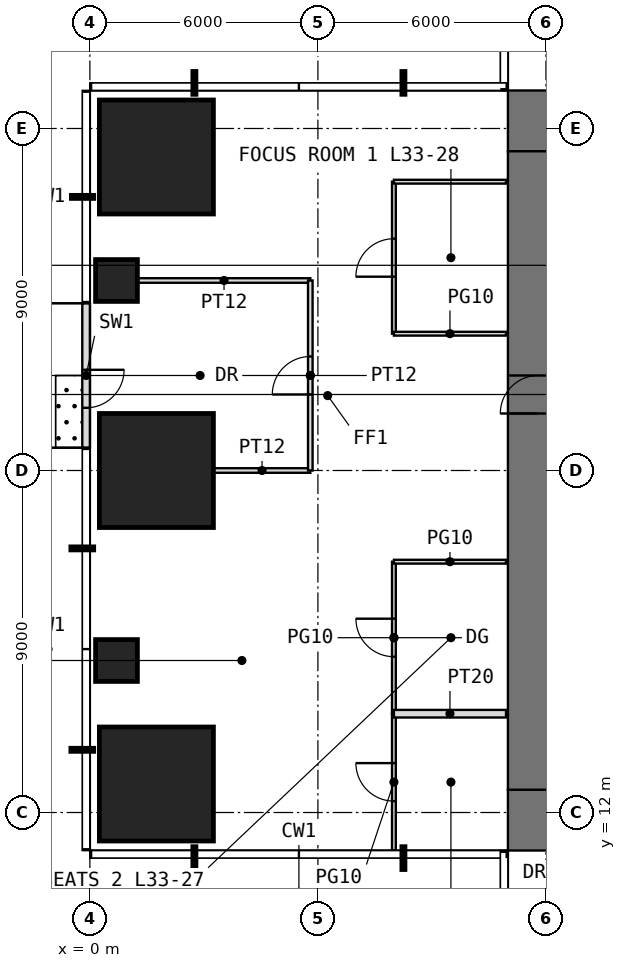
"""IFC4 building model, lengths in metres.
Left out: names, types, materials, properties, quantities, classifications, styles, units other than length and angle.
Written with IfcOpenShell. Run it as: python <this file> out.ifc"""

import sys

from ifc_helpers import new_model, si_unit, direction, frame, frame_2d, origin, origin_2d, place, context, subcontext, project, spatial, rectangle, extrude, element, fill, save


model = new_model("IFC4")
c1 = context("Model", 3, precision=1e-05, world=origin(), true_north=direction((0.0, 1.0)))
c2 = subcontext(c1, "Body", "Model", "MODEL_VIEW")
j1 = project(units=[si_unit("LENGTHUNIT", "METRE"), si_unit("PLANEANGLEUNIT", "RADIAN")], contexts=[c1])
p1 = place(None, origin())
s1 = spatial("IfcSite", under=j1, at=p1, CompositionType="ELEMENT")
p2 = place(p1, origin())
s2 = spatial("IfcBuilding", under=s1, at=p2, CompositionType="ELEMENT")
p3 = place(p2, frame((0.0, 0.0, 140.5)))
s3 = spatial("IfcBuildingStorey", under=s2, at=p3, CompositionType="ELEMENT", Elevation=140.5)
p4 = place(p3, frame((1.75, 12.75, 0.0), z_axis=(0.0, 0.0, 1.0), x_axis=(1.0, 0.0, 0.0)))
e1 = element("IfcColumn", 1, at=p4, inside=s3, PredefinedType="COLUMN", context=c2, shape_type="SweptSolid", body=[
    extrude(rectangle(XDim=3.0, YDim=3.0, at=origin_2d()), origin(), (0.0, 0.0, 1.0), 4.0),
])
p5 = place(p3, frame((0.7, 16.0, 0.0), z_axis=(0.0, 0.0, 1.0), x_axis=(1.0, 0.0, 0.0)))
e2 = element("IfcColumn", 2, at=p5, inside=s3, PredefinedType="COLUMN", context=c2, shape_type="SweptSolid", body=[
    extrude(rectangle(XDim=1.1, YDim=1.1, at=origin_2d()), origin(), (0.0, 0.0, 1.0), 4.0),
])
p6 = place(p3, frame((1.75, 21.0, 0.0), z_axis=(0.0, 0.0, 1.0), x_axis=(1.0, 0.0, 0.0)))
e3 = element("IfcColumn", 3, at=p6, inside=s3, PredefinedType="COLUMN", context=c2, shape_type="SweptSolid", body=[
    extrude(rectangle(XDim=3.0, YDim=3.0, at=origin_2d()), origin(), (0.0, 0.0, 1.0), 4.0),
])
p7 = place(p3, frame((0.7, 26.0, 0.0), z_axis=(0.0, 0.0, 1.0), x_axis=(1.0, 0.0, 0.0)))
e4 = element("IfcColumn", 4, at=p7, inside=s3, PredefinedType="COLUMN", context=c2, shape_type="SweptSolid", body=[
    extrude(rectangle(XDim=1.1, YDim=1.1, at=origin_2d()), origin(), (0.0, 0.0, 1.0), 4.0),
])
p8 = place(p3, frame((1.75, 29.25, 0.0), z_axis=(0.0, 0.0, 1.0), x_axis=(1.0, 0.0, 0.0)))
e5 = element("IfcColumn", 5, at=p8, inside=s3, PredefinedType="COLUMN", context=c2, shape_type="SweptSolid", body=[
    extrude(rectangle(XDim=3.0, YDim=3.0, at=origin_2d()), origin(), (0.0, 0.0, 1.0), 4.0),
])
p9 = place(p3, frame((-0.1, 25.4, 0.0), z_axis=(0.0, 0.0, 1.0), x_axis=(0.0, -1.0, 0.0)))
e6 = element("IfcWall", 6, at=p9, inside=s3, PredefinedType="USERDEFINED", context=c2, shape_type="SweptSolid", body=[
    extrude(rectangle(XDim=3.8, YDim=0.2, at=frame_2d((1.9, 0.0))), origin(), (0.0, 0.0, 1.0), 3.75),
])
p10 = place(p9, frame((1.75, 0.0, 0.0)))
e7 = element("IfcOpeningElement", 7, at=p10, cuts=e6, PredefinedType="OPENING", context=c2, shape_type="SweptSolid", body=[
    extrude(rectangle(XDim=1.0, YDim=2.4, at=frame_2d((0.5, 1.2))), frame((0.0, 0.11, 0.0), z_axis=(0.0, -1.0, 0.0), x_axis=(1.0, 0.0, 0.0)), (0.0, 0.0, 1.0), 0.22),
])
p11 = place(p3, frame((11.0, 11.8, -0.05), z_axis=(0.0, 0.0, 1.0), x_axis=(1.0, 0.0, 0.0)))
e8 = element("IfcWall", 8, at=p11, inside=s3, PredefinedType="SHEAR", context=c2, shape_type="SweptSolid", body=[
    extrude(rectangle(XDim=20.0, YDim=1.6, at=frame_2d((10.0, 0.0))), origin(), (0.0, 0.0, 1.0), 4.0),
])
p12 = place(p11, frame((9.0, 0.0, 0.05)))
e9 = element("IfcOpeningElement", 9, at=p12, cuts=e8, PredefinedType="OPENING", context=c2, shape_type="SweptSolid", body=[
    extrude(rectangle(XDim=2.0, YDim=2.2, at=frame_2d((1.0, 1.1))), frame((0.0, 0.81, 0.0), z_axis=(0.0, -1.0, 0.0), x_axis=(1.0, 0.0, 0.0)), (0.0, 0.0, 1.0), 1.62),
])
p13 = place(p3, frame((11.0, 30.2, -0.05), z_axis=(0.0, 0.0, 1.0), x_axis=(1.0, 0.0, 0.0)))
e10 = element("IfcWall", 10, at=p13, inside=s3, PredefinedType="SHEAR", context=c2, shape_type="SweptSolid", body=[
    extrude(rectangle(XDim=20.0, YDim=1.6, at=frame_2d((10.0, 0.0))), origin(), (0.0, 0.0, 1.0), 4.0),
])
p14 = place(p13, frame((9.0, 0.0, 0.05)))
e11 = element("IfcOpeningElement", 11, at=p14, cuts=e10, PredefinedType="OPENING", context=c2, shape_type="SweptSolid", body=[
    extrude(rectangle(XDim=2.0, YDim=2.2, at=frame_2d((1.0, 1.1))), frame((0.0, 0.81, 0.0), z_axis=(0.0, -1.0, 0.0), x_axis=(1.0, 0.0, 0.0)), (0.0, 0.0, 1.0), 1.62),
])
p15 = place(p3, frame((11.8, 12.6, -0.05), z_axis=(0.0, 0.0, 1.0), x_axis=(0.0, 1.0, 0.0)))
e12 = element("IfcWall", 12, at=p15, inside=s3, PredefinedType="SHEAR", context=c2, shape_type="SweptSolid", body=[
    extrude(rectangle(XDim=16.8, YDim=1.6, at=frame_2d((8.4, 0.0))), origin(), (0.0, 0.0, 1.0), 4.0),
])
p16 = place(p15, frame((9.9, 0.0, 0.05)))
e13 = element("IfcOpeningElement", 13, at=p16, cuts=e12, PredefinedType="OPENING", context=c2, shape_type="SweptSolid", body=[
    extrude(rectangle(XDim=1.0, YDim=2.2, at=frame_2d((0.5, 1.1))), frame((0.0, 0.81, 0.0), z_axis=(0.0, -1.0, 0.0), x_axis=(1.0, 0.0, 0.0)), (0.0, 0.0, 1.0), 1.62),
])
p17 = place(p3, frame((1.26, 26.0, 0.0), z_axis=(0.0, 0.0, 1.0), x_axis=(1.0, 0.0, 0.0)))
e14 = element("IfcWall", 14, at=p17, inside=s3, PredefinedType="PARTITIONING", context=c2, shape_type="SweptSolid", body=[
    extrude(rectangle(XDim=4.54, YDim=0.12, at=frame_2d((2.27, 0.0))), origin(), (0.0, 0.0, 1.0), 3.75),
])
p18 = place(p3, frame((3.26, 21.0, 0.0), z_axis=(0.0, 0.0, 1.0), x_axis=(1.0, 0.0, 0.0)))
e15 = element("IfcWall", 15, at=p18, inside=s3, PredefinedType="PARTITIONING", context=c2, shape_type="SweptSolid", body=[
    extrude(rectangle(XDim=2.54, YDim=0.12, at=frame_2d((1.27, 0.0))), origin(), (0.0, 0.0, 1.0), 3.75),
])
p19 = place(p3, frame((5.8, 21.0, 0.0), z_axis=(0.0, 0.0, 1.0), x_axis=(0.0, 1.0, 0.0)))
e16 = element("IfcWall", 16, at=p19, inside=s3, PredefinedType="PARTITIONING", context=c2, shape_type="SweptSolid", body=[
    extrude(rectangle(XDim=5.0, YDim=0.12, at=frame_2d((2.5, 0.0))), origin(), (0.0, 0.0, 1.0), 3.75),
])
p20 = place(p19, frame((2.0, 0.0, 0.0)))
e17 = element("IfcOpeningElement", 17, at=p20, cuts=e16, PredefinedType="OPENING", context=c2, shape_type="SweptSolid", body=[
    extrude(rectangle(XDim=1.0, YDim=2.2, at=frame_2d((0.5, 1.1))), frame((0.0, 0.07, 0.0), z_axis=(0.0, -1.0, 0.0), x_axis=(1.0, 0.0, 0.0)), (0.0, 0.0, 1.0), 0.14),
])
p21 = place(p3, frame((8.0, 11.0, 0.0), z_axis=(0.0, 0.0, 1.0), x_axis=(0.0, 1.0, 0.0)))
e18 = element("IfcWall", 18, at=p21, inside=s3, PredefinedType="PARTITIONING", context=c2, shape_type="SweptSolid", body=[
    extrude(rectangle(XDim=3.6, YDim=0.1, at=frame_2d((1.8, 0.0))), origin(), (0.0, 0.0, 1.0), 3.75),
])
p22 = place(p21, frame((1.3, 0.0, 0.0)))
e19 = element("IfcOpeningElement", 19, at=p22, cuts=e18, PredefinedType="OPENING", context=c2, shape_type="SweptSolid", body=[
    extrude(rectangle(XDim=1.0, YDim=2.4, at=frame_2d((0.5, 1.2))), frame((0.0, 0.06, 0.0), z_axis=(0.0, -1.0, 0.0), x_axis=(1.0, 0.0, 0.0)), (0.0, 0.0, 1.0), 0.12),
])
p23 = place(p3, frame((8.0, 14.6, 0.0), z_axis=(0.0, 0.0, 1.0), x_axis=(0.0, 1.0, 0.0)))
e20 = element("IfcWall", 20, at=p23, inside=s3, PredefinedType="PARTITIONING", context=c2, shape_type="SweptSolid", body=[
    extrude(rectangle(XDim=4.0, YDim=0.1, at=frame_2d((2.0, 0.0))), origin(), (0.0, 0.0, 1.0), 3.75),
])
p24 = place(p23, frame((1.5, 0.0, 0.0)))
e21 = element("IfcOpeningElement", 21, at=p24, cuts=e20, PredefinedType="OPENING", context=c2, shape_type="SweptSolid", body=[
    extrude(rectangle(XDim=1.0, YDim=2.4, at=frame_2d((0.5, 1.2))), frame((0.0, 0.06, 0.0), z_axis=(0.0, -1.0, 0.0), x_axis=(1.0, 0.0, 0.0)), (0.0, 0.0, 1.0), 0.12),
])
p25 = place(p3, frame((8.0, 14.6, 0.0), z_axis=(0.0, 0.0, 1.0), x_axis=(1.0, 0.0, 0.0)))
e22 = element("IfcWall", 22, at=p25, inside=s3, PredefinedType="PARTITIONING", context=c2, shape_type="SweptSolid", body=[
    extrude(rectangle(XDim=2.95, YDim=0.2, at=frame_2d((1.475, 0.0))), origin(), (0.0, 0.0, 1.0), 3.75),
])
p26 = place(p3, frame((8.0, 18.6, 0.0), z_axis=(0.0, 0.0, 1.0), x_axis=(1.0, 0.0, 0.0)))
e23 = element("IfcWall", 23, at=p26, inside=s3, PredefinedType="PARTITIONING", context=c2, shape_type="SweptSolid", body=[
    extrude(rectangle(XDim=2.95, YDim=0.1, at=frame_2d((1.475, 0.0))), origin(), (0.0, 0.0, 1.0), 3.75),
])
p27 = place(p3, frame((8.0, 24.6, 0.0), z_axis=(0.0, 0.0, 1.0), x_axis=(0.0, 1.0, 0.0)))
e24 = element("IfcWall", 24, at=p27, inside=s3, PredefinedType="PARTITIONING", context=c2, shape_type="SweptSolid", body=[
    extrude(rectangle(XDim=4.0, YDim=0.1, at=frame_2d((2.0, 0.0))), origin(), (0.0, 0.0, 1.0), 3.75),
])
p28 = place(p27, frame((1.5, 0.0, 0.0)))
e25 = element("IfcOpeningElement", 25, at=p28, cuts=e24, PredefinedType="OPENING", context=c2, shape_type="SweptSolid", body=[
    extrude(rectangle(XDim=1.0, YDim=2.4, at=frame_2d((0.5, 1.2))), frame((0.0, 0.06, 0.0), z_axis=(0.0, -1.0, 0.0), x_axis=(1.0, 0.0, 0.0)), (0.0, 0.0, 1.0), 0.12),
])
for number, where, z_axis, x_axis in (
    (26, (8.0, 24.6, 0.0), (0.0, 0.0, 1.0), (1.0, 0.0, 0.0)),
    (27, (8.0, 28.6, 0.0), (0.0, 0.0, 1.0), (1.0, 0.0, 0.0)),
):
    element("IfcWall", number, at=place(p3, frame(where, z_axis=z_axis, x_axis=x_axis)), inside=s3, PredefinedType="PARTITIONING", context=c2, shape_type="SweptSolid", body=[
        extrude(rectangle(XDim=2.95, YDim=0.1, at=frame_2d((1.475, 0.0))), origin(), (0.0, 0.0, 1.0), 3.75),
    ])
p29 = place(p10, origin())
e28 = element("IfcDoor", 28, at=p29, inside=s3, OperationType="SINGLE_SWING_LEFT", PredefinedType="DOOR", context=c2, shape_type="SweptSolid", body=[
    extrude(rectangle(XDim=1.0, YDim=2.4, at=frame_2d((0.5, 1.2))), frame((0.0, 0.025, 0.0), z_axis=(0.0, -1.0, 0.0), x_axis=(1.0, 0.0, 0.0)), (0.0, 0.0, 1.0), 0.05),
])
fill(e7, e28)
p30 = place(p16, origin())
e29 = element("IfcDoor", 29, at=p30, inside=s3, OperationType="SINGLE_SWING_LEFT", PredefinedType="DOOR", context=c2, shape_type="SweptSolid", body=[
    extrude(rectangle(XDim=1.0, YDim=2.2, at=frame_2d((0.5, 1.1))), frame((0.0, 0.025, 0.0), z_axis=(0.0, -1.0, 0.0), x_axis=(1.0, 0.0, 0.0)), (0.0, 0.0, 1.0), 0.05),
])
fill(e13, e29)
p31 = place(p22, origin())
e30 = element("IfcDoor", 30, at=p31, inside=s3, OperationType="SINGLE_SWING_RIGHT", PredefinedType="DOOR", context=c2, shape_type="SweptSolid", body=[
    extrude(rectangle(XDim=1.0, YDim=2.4, at=frame_2d((0.5, 1.2))), frame((0.0, 0.025, 0.0), z_axis=(0.0, -1.0, 0.0), x_axis=(1.0, 0.0, 0.0)), (0.0, 0.0, 1.0), 0.05),
])
fill(e19, e30)
p32 = place(p24, origin())
e31 = element("IfcDoor", 31, at=p32, inside=s3, OperationType="SINGLE_SWING_RIGHT", PredefinedType="DOOR", context=c2, shape_type="SweptSolid", body=[
    extrude(rectangle(XDim=1.0, YDim=2.4, at=frame_2d((0.5, 1.2))), frame((0.0, 0.025, 0.0), z_axis=(0.0, -1.0, 0.0), x_axis=(1.0, 0.0, 0.0)), (0.0, 0.0, 1.0), 0.05),
])
fill(e21, e31)
p33 = place(p28, origin())
e32 = element("IfcDoor", 32, at=p33, inside=s3, OperationType="SINGLE_SWING_LEFT", PredefinedType="DOOR", context=c2, shape_type="SweptSolid", body=[
    extrude(rectangle(XDim=1.0, YDim=2.4, at=frame_2d((0.5, 1.2))), frame((0.0, 0.025, 0.0), z_axis=(0.0, -1.0, 0.0), x_axis=(1.0, 0.0, 0.0)), (0.0, 0.0, 1.0), 0.05),
])
fill(e25, e32)
p34 = place(p20, origin())
e33 = element("IfcDoor", 33, at=p34, inside=s3, OperationType="SINGLE_SWING_LEFT", PredefinedType="DOOR", context=c2, shape_type="SweptSolid", body=[
    extrude(rectangle(XDim=1.0, YDim=2.2, at=frame_2d((0.5, 1.1))), frame((0.0, 0.025, 0.0), z_axis=(0.0, -1.0, 0.0), x_axis=(1.0, 0.0, 0.0)), (0.0, 0.0, 1.0), 0.05),
])
fill(e17, e33)
save(model, sys.argv[1])
